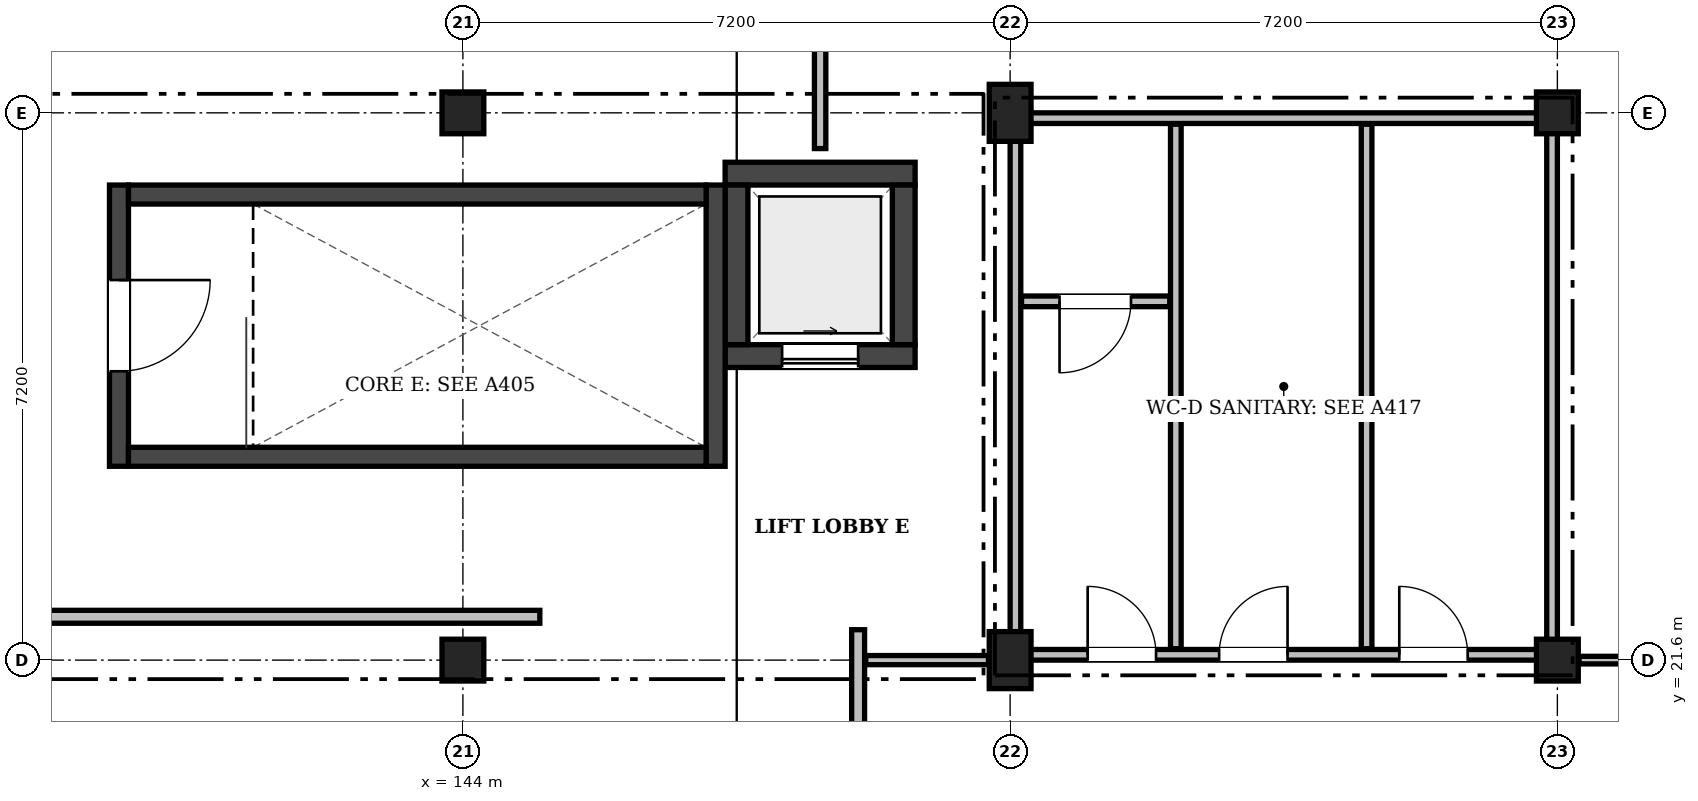
"""IFC4 building model, lengths in metres.
Left out: names, types, materials, properties, quantities, classifications, styles, units other than length and angle.
Written with IfcOpenShell. Run it as: python <this file> out.ifc"""

import sys

from ifc_helpers import new_model, si_unit, direction, frame, frame_2d, origin, origin_2d, place, context, subcontext, project, spatial, rectangle, extrude, element, fill, save


model = new_model("IFC4")
c1 = context("Model", 3, precision=1e-05, world=origin(), true_north=direction((0.0, 1.0)))
c2 = subcontext(c1, "Body", "Model", "MODEL_VIEW")
j1 = project(units=[si_unit("LENGTHUNIT", "METRE"), si_unit("PLANEANGLEUNIT", "RADIAN")], contexts=[c1])
p1 = place(None, origin())
s1 = spatial("IfcSite", under=j1, at=p1, CompositionType="ELEMENT")
p2 = place(p1, origin())
s2 = spatial("IfcBuilding", under=s1, at=p2, CompositionType="ELEMENT")
p3 = place(p2, frame((0.0, 0.0, 9.6)))
s3 = spatial("IfcBuildingStorey", under=s2, at=p3, CompositionType="ELEMENT", Elevation=9.6)
for number, where, z_axis, x_axis in (
    (1, (144.0, 21.6, 0.0), (0.0, 0.0, 1.0), (1.0, 0.0, 0.0)),
    (2, (144.0, 28.8, 0.0), (0.0, 0.0, 1.0), (1.0, 0.0, 0.0)),
):
    element("IfcColumn", number, at=place(p3, frame(where, z_axis=z_axis, x_axis=x_axis)), inside=s3, PredefinedType="COLUMN", context=c2, shape_type="SweptSolid", body=[
        extrude(rectangle(XDim=0.55, YDim=0.55, at=origin_2d()), origin(), (0.0, 0.0, 1.0), 4.8),
    ])
for number, where, z_axis, x_axis in (
    (3, (151.2, 21.6, 0.0), (0.0, 0.0, 1.0), (1.0, 0.0, 0.0)),
    (4, (151.2, 28.8, 0.0), (0.0, 0.0, 1.0), (1.0, 0.0, 0.0)),
):
    element("IfcColumn", number, at=place(p3, frame(where, z_axis=z_axis, x_axis=x_axis)), inside=s3, PredefinedType="COLUMN", context=c2, shape_type="SweptSolid", body=[
        extrude(rectangle(XDim=0.55, YDim=0.75, at=origin_2d()), origin(), (0.0, 0.0, 1.0), 4.8),
    ])
for number, where, z_axis, x_axis in (
    (5, (158.4, 21.6, 0.0), (0.0, 0.0, 1.0), (1.0, 0.0, 0.0)),
    (6, (158.4, 28.8, 0.0), (0.0, 0.0, 1.0), (1.0, 0.0, 0.0)),
):
    element("IfcColumn", number, at=place(p3, frame(where, z_axis=z_axis, x_axis=x_axis)), inside=s3, PredefinedType="COLUMN", context=c2, shape_type="SweptSolid", body=[
        extrude(rectangle(XDim=0.55, YDim=0.55, at=origin_2d()), origin(), (0.0, 0.0, 1.0), 4.8),
    ])
p4 = place(p3, frame((147.45, 25.6, 0.0), z_axis=(0.0, 0.0, 1.0), x_axis=(1.0, 0.0, 0.0)))
e7 = element("IfcWall", 7, at=p4, inside=s3, PredefinedType="SHEAR", context=c2, shape_type="SweptSolid", body=[
    extrude(rectangle(XDim=2.5, YDim=0.3, at=frame_2d((1.25, 0.0))), origin(), (0.0, 0.0, 1.0), 9.79),
])
p5 = place(p4, frame((0.75, 0.0, 0.0)))
e8 = element("IfcOpeningElement", 8, at=p5, cuts=e7, PredefinedType="OPENING", context=c2, shape_type="SweptSolid", body=[
    extrude(rectangle(XDim=1.0, YDim=2.1, at=frame_2d((0.5, 1.05))), frame((0.0, 0.162, 0.0), z_axis=(0.0, -1.0, 0.0), x_axis=(1.0, 0.0, 0.0)), (0.0, 0.0, 1.0), 0.324),
])
p6 = place(p3, frame((147.45, 28.0, 0.0), z_axis=(0.0, 0.0, 1.0), x_axis=(1.0, 0.0, 0.0)))
e9 = element("IfcWall", 9, at=p6, inside=s3, PredefinedType="SHEAR", context=c2, shape_type="SweptSolid", body=[
    extrude(rectangle(XDim=2.5, YDim=0.3, at=frame_2d((1.25, 0.0))), origin(), (0.0, 0.0, 1.0), 9.79),
])
for number, where, z_axis, x_axis in (
    (10, (147.6, 25.75, 0.0), (0.0, 0.0, 1.0), (0.0, 1.0, 0.0)),
    (11, (149.8, 25.75, 0.0), (0.0, 0.0, 1.0), (0.0, 1.0, 0.0)),
):
    element("IfcWall", number, at=place(p3, frame(where, z_axis=z_axis, x_axis=x_axis)), inside=s3, PredefinedType="SHEAR", context=c2, shape_type="SweptSolid", body=[
        extrude(rectangle(XDim=2.1, YDim=0.3, at=frame_2d((1.05, 0.0))), origin(), (0.0, 0.0, 1.0), 9.79),
    ])
p7 = place(p3, frame((139.475, 24.15, 0.0), z_axis=(0.0, 0.0, 1.0), x_axis=(0.0, 1.0, 0.0)))
e12 = element("IfcWall", 12, at=p7, inside=s3, PredefinedType="SHEAR", context=c2, shape_type="SweptSolid", body=[
    extrude(rectangle(XDim=3.7, YDim=0.25, at=frame_2d((1.85, 0.0))), origin(), (0.0, 0.0, 1.0), 4.55),
])
p8 = place(p7, frame((1.25, 0.0, 0.0)))
e13 = element("IfcOpeningElement", 13, at=p8, cuts=e12, PredefinedType="OPENING", context=c2, shape_type="SweptSolid", body=[
    extrude(rectangle(XDim=1.2, YDim=2.15, at=frame_2d((0.6, 1.075))), frame((0.0, 0.137, 0.0), z_axis=(0.0, -1.0, 0.0), x_axis=(1.0, 0.0, 0.0)), (0.0, 0.0, 1.0), 0.274),
])
p9 = place(p3, frame((147.325, 24.15, 0.0), z_axis=(0.0, 0.0, 1.0), x_axis=(0.0, 1.0, 0.0)))
e14 = element("IfcWall", 14, at=p9, inside=s3, PredefinedType="SHEAR", context=c2, shape_type="SweptSolid", body=[
    extrude(rectangle(XDim=3.7, YDim=0.25, at=frame_2d((1.85, 0.0))), origin(), (0.0, 0.0, 1.0), 4.55),
])
for number, where, z_axis, x_axis in (
    (15, (139.6, 24.275, 0.0), (0.0, 0.0, 1.0), (1.0, 0.0, 0.0)),
    (16, (139.6, 27.725, 0.0), (0.0, 0.0, 1.0), (1.0, 0.0, 0.0)),
):
    element("IfcWall", number, at=place(p3, frame(where, z_axis=z_axis, x_axis=x_axis)), inside=s3, PredefinedType="SHEAR", context=c2, shape_type="SweptSolid", body=[
        extrude(rectangle(XDim=7.6, YDim=0.25, at=frame_2d((3.8, 0.0))), origin(), (0.0, 0.0, 1.0), 4.55),
    ])
p10 = place(p3, frame((151.27, 21.67, 0.0), z_axis=(0.0, 0.0, 1.0), x_axis=(1.0, 0.0, 0.0)))
e17 = element("IfcWall", 17, at=p10, inside=s3, PredefinedType="PARTITIONING", context=c2, shape_type="SweptSolid", body=[
    extrude(rectangle(XDim=7.06, YDim=0.14, at=frame_2d((3.53, 0.0))), origin(), (0.0, 0.0, 1.0), 4.46),
])
p11 = place(p10, frame((0.95, 0.0, 0.0)))
e18 = element("IfcOpeningElement", 18, at=p11, cuts=e17, PredefinedType="OPENING", context=c2, shape_type="SweptSolid", body=[
    extrude(rectangle(XDim=0.9, YDim=2.08, at=frame_2d((0.45, 1.04))), frame((0.0, 0.082, 0.0), z_axis=(0.0, -1.0, 0.0), x_axis=(1.0, 0.0, 0.0)), (0.0, 0.0, 1.0), 0.164),
])
p12 = place(p10, frame((2.68, 0.0, 0.0)))
e19 = element("IfcOpeningElement", 19, at=p12, cuts=e17, PredefinedType="OPENING", context=c2, shape_type="SweptSolid", body=[
    extrude(rectangle(XDim=0.9, YDim=2.08, at=frame_2d((0.45, 1.04))), frame((0.0, 0.082, 0.0), z_axis=(0.0, -1.0, 0.0), x_axis=(1.0, 0.0, 0.0)), (0.0, 0.0, 1.0), 0.164),
])
p13 = place(p10, frame((5.05, 0.0, 0.0)))
e20 = element("IfcOpeningElement", 20, at=p13, cuts=e17, PredefinedType="OPENING", context=c2, shape_type="SweptSolid", body=[
    extrude(rectangle(XDim=0.9, YDim=2.08, at=frame_2d((0.45, 1.04))), frame((0.0, 0.082, 0.0), z_axis=(0.0, -1.0, 0.0), x_axis=(1.0, 0.0, 0.0)), (0.0, 0.0, 1.0), 0.164),
])
p14 = place(p3, frame((151.27, 28.73, 0.0), z_axis=(0.0, 0.0, 1.0), x_axis=(1.0, 0.0, 0.0)))
e21 = element("IfcWall", 21, at=p14, inside=s3, PredefinedType="PARTITIONING", context=c2, shape_type="SweptSolid", body=[
    extrude(rectangle(XDim=7.06, YDim=0.14, at=frame_2d((3.53, 0.0))), origin(), (0.0, 0.0, 1.0), 4.46),
])
for number, where, z_axis, x_axis in (
    (22, (151.27, 21.75, 0.0), (0.0, 0.0, 1.0), (0.0, 1.0, 0.0)),
    (23, (158.33, 21.75, 0.0), (0.0, 0.0, 1.0), (0.0, 1.0, 0.0)),
    (24, (153.38, 21.75, 0.0), (0.0, 0.0, 1.0), (0.0, 1.0, 0.0)),
    (25, (155.89, 21.75, 0.0), (0.0, 0.0, 1.0), (0.0, 1.0, 0.0)),
):
    element("IfcWall", number, at=place(p3, frame(where, z_axis=z_axis, x_axis=x_axis)), inside=s3, PredefinedType="PARTITIONING", context=c2, shape_type="SweptSolid", body=[
        extrude(rectangle(XDim=6.9, YDim=0.14, at=frame_2d((3.45, 0.0))), origin(), (0.0, 0.0, 1.0), 4.46),
    ])
p15 = place(p3, frame((151.35, 26.32, 0.0), z_axis=(0.0, 0.0, 1.0), x_axis=(1.0, 0.0, 0.0)))
e26 = element("IfcWall", 26, at=p15, inside=s3, PredefinedType="PARTITIONING", context=c2, shape_type="SweptSolid", body=[
    extrude(rectangle(XDim=1.95, YDim=0.14, at=frame_2d((0.975, 0.0))), origin(), (0.0, 0.0, 1.0), 4.46),
])
p16 = place(p15, frame((0.5, 0.0, 0.0)))
e27 = element("IfcOpeningElement", 27, at=p16, cuts=e26, PredefinedType="OPENING", context=c2, shape_type="SweptSolid", body=[
    extrude(rectangle(XDim=0.94, YDim=2.1, at=frame_2d((0.47, 1.05))), frame((0.0, 0.082, 0.0), z_axis=(0.0, -1.0, 0.0), x_axis=(1.0, 0.0, 0.0)), (0.0, 0.0, 1.0), 0.164),
])
p17 = place(p3, frame((149.2, 17.96, 0.0), z_axis=(0.0, 0.0, 1.0), x_axis=(0.0, 1.0, 0.0)))
e28 = element("IfcWall", 28, at=p17, inside=s3, PredefinedType="PARTITIONING", context=c2, shape_type="SweptSolid", body=[
    extrude(rectangle(XDim=4.04, YDim=0.17, at=frame_2d((2.02, 0.0))), origin(), (0.0, 0.0, 1.0), 4.46),
])
p18 = place(p3, frame((129.04, 22.17, 0.0), z_axis=(0.0, 0.0, 1.0), x_axis=(1.0, 0.0, 0.0)))
e29 = element("IfcWall", 29, at=p18, inside=s3, PredefinedType="PARTITIONING", context=c2, shape_type="SweptSolid", body=[
    extrude(rectangle(XDim=15.972, YDim=0.17, at=frame_2d((7.986, 0.0))), origin(), (0.0, 0.0, 1.0), 4.46),
])
p19 = place(p3, frame((149.3, 21.6, 0.0), z_axis=(0.0, 0.0, 1.0), x_axis=(1.0, 0.0, 0.0)))
e30 = element("IfcWall", 30, at=p19, inside=s3, PredefinedType="PARTITIONING", context=c2, shape_type="SweptSolid", body=[
    extrude(rectangle(XDim=1.615, YDim=0.12, at=frame_2d((0.808, 0.0))), origin(), (0.0, 0.0, 1.0), 4.46),
])
p20 = place(p3, frame((158.685, 21.6, 0.0), z_axis=(0.0, 0.0, 1.0), x_axis=(1.0, 0.0, 0.0)))
e31 = element("IfcWall", 31, at=p20, inside=s3, PredefinedType="PARTITIONING", context=c2, shape_type="SweptSolid", body=[
    extrude(rectangle(XDim=6.763, YDim=0.1, at=frame_2d((3.381, 0.0))), origin(), (0.0, 0.0, 1.0), 4.46),
])
p21 = place(p3, frame((148.7, 28.33, 0.0), z_axis=(0.0, 0.0, 1.0), x_axis=(0.0, 1.0, 0.0)))
e32 = element("IfcWall", 32, at=p21, inside=s3, PredefinedType="PARTITIONING", context=c2, shape_type="SweptSolid", body=[
    extrude(rectangle(XDim=7.518, YDim=0.15, at=frame_2d((3.759, 0.0))), origin(), (0.0, 0.0, 1.0), 4.46),
])
p22 = place(p21, frame((2.895, 0.0, 0.0)))
e33 = element("IfcOpeningElement", 33, at=p22, cuts=e32, PredefinedType="OPENING", context=c2, shape_type="SweptSolid", body=[
    extrude(rectangle(XDim=1.56, YDim=2.26, at=frame_2d((0.78, 1.13))), frame((0.0, 0.087, 0.0), z_axis=(0.0, -1.0, 0.0), x_axis=(1.0, 0.0, 0.0)), (0.0, 0.0, 1.0), 0.174),
])
p23 = place(p5, frame((1.0, 0.0, 0.0), z_axis=(0.0, 0.0, 1.0), x_axis=(-1.0, 0.0, 0.0)))
e34 = element("IfcDoor", 34, at=p23, inside=s3, OperationType="SLIDING_TO_RIGHT", PredefinedType="DOOR", context=c2, shape_type="SweptSolid", body=[
    extrude(rectangle(XDim=1.0, YDim=2.1, at=frame_2d((0.5, 1.05))), frame((0.0, 0.025, 0.0), z_axis=(0.0, -1.0, 0.0), x_axis=(1.0, 0.0, 0.0)), (0.0, 0.0, 1.0), 0.05),
])
fill(e8, e34)
p24 = place(p8, frame((1.2, 0.0, 0.0), z_axis=(0.0, 0.0, 1.0), x_axis=(-1.0, 0.0, 0.0)))
e35 = element("IfcDoor", 35, at=p24, inside=s3, OperationType="SINGLE_SWING_LEFT", PredefinedType="DOOR", context=c2, shape_type="SweptSolid", body=[
    extrude(rectangle(XDim=1.2, YDim=2.15, at=frame_2d((0.6, 1.075))), frame((0.0, 0.025, 0.0), z_axis=(0.0, -1.0, 0.0), x_axis=(1.0, 0.0, 0.0)), (0.0, 0.0, 1.0), 0.05),
])
fill(e13, e35)
p25 = place(p11, origin())
e36 = element("IfcDoor", 36, at=p25, inside=s3, OperationType="SINGLE_SWING_LEFT", PredefinedType="DOOR", context=c2, shape_type="SweptSolid", body=[
    extrude(rectangle(XDim=0.9, YDim=2.08, at=frame_2d((0.45, 1.04))), frame((0.0, 0.025, 0.0), z_axis=(0.0, -1.0, 0.0), x_axis=(1.0, 0.0, 0.0)), (0.0, 0.0, 1.0), 0.05),
])
fill(e18, e36)
p26 = place(p12, origin())
e37 = element("IfcDoor", 37, at=p26, inside=s3, OperationType="SINGLE_SWING_RIGHT", PredefinedType="DOOR", context=c2, shape_type="SweptSolid", body=[
    extrude(rectangle(XDim=0.9, YDim=2.08, at=frame_2d((0.45, 1.04))), frame((0.0, 0.025, 0.0), z_axis=(0.0, -1.0, 0.0), x_axis=(1.0, 0.0, 0.0)), (0.0, 0.0, 1.0), 0.05),
])
fill(e19, e37)
p27 = place(p13, origin())
e38 = element("IfcDoor", 38, at=p27, inside=s3, OperationType="SINGLE_SWING_LEFT", PredefinedType="DOOR", context=c2, shape_type="SweptSolid", body=[
    extrude(rectangle(XDim=0.9, YDim=2.08, at=frame_2d((0.45, 1.04))), frame((0.0, 0.025, 0.0), z_axis=(0.0, -1.0, 0.0), x_axis=(1.0, 0.0, 0.0)), (0.0, 0.0, 1.0), 0.05),
])
fill(e20, e38)
p28 = place(p16, frame((0.94, 0.0, 0.0), z_axis=(0.0, 0.0, 1.0), x_axis=(-1.0, 0.0, 0.0)))
e39 = element("IfcDoor", 39, at=p28, inside=s3, OperationType="SINGLE_SWING_RIGHT", PredefinedType="DOOR", context=c2, shape_type="SweptSolid", body=[
    extrude(rectangle(XDim=0.94, YDim=2.1, at=frame_2d((0.47, 1.05))), frame((0.0, 0.025, 0.0), z_axis=(0.0, -1.0, 0.0), x_axis=(1.0, 0.0, 0.0)), (0.0, 0.0, 1.0), 0.05),
])
fill(e27, e39)
save(model, sys.argv[1])
